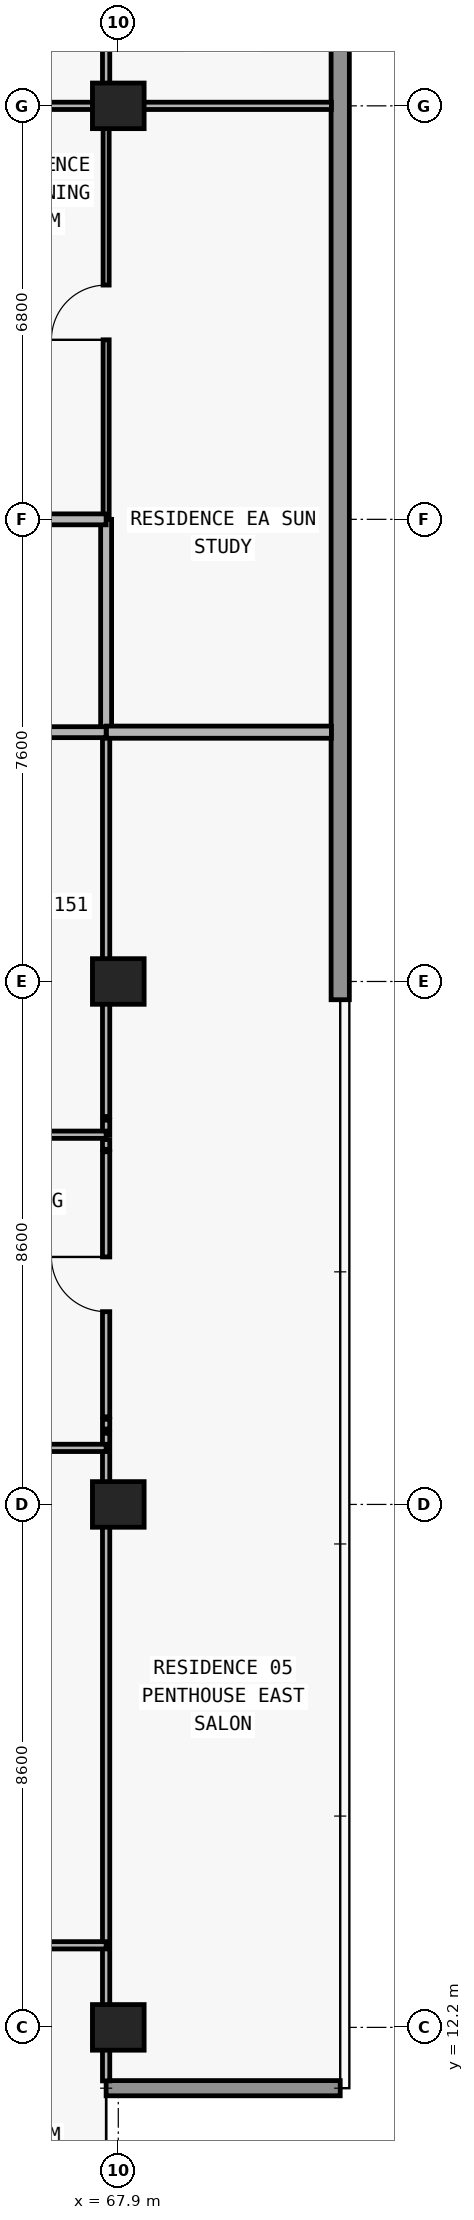
"""IFC4 building model, lengths in metres.
Left out: names, types, materials, properties, quantities, classifications, styles, units other than length and angle.
Written with IfcOpenShell. Run it as: python <this file> out.ifc"""

import sys

from ifc_helpers import new_model, si_unit, direction, frame, frame_2d, origin, origin_2d, place, context, subcontext, project, spatial, rectangle, extrude, element, fill, save


model = new_model("IFC4")
c1 = context("Model", 3, precision=1e-05, world=origin(), true_north=direction((0.0, 1.0)))
c2 = subcontext(c1, "Body", "Model", "MODEL_VIEW")
j1 = project(units=[si_unit("LENGTHUNIT", "METRE"), si_unit("PLANEANGLEUNIT", "RADIAN")], contexts=[c1])
p1 = place(None, origin())
s1 = spatial("IfcSite", under=j1, at=p1, CompositionType="ELEMENT")
p2 = place(p1, origin())
s2 = spatial("IfcBuilding", under=s1, at=p2, CompositionType="ELEMENT")
p3 = place(p2, frame((0.0, 0.0, 195.0)))
s3 = spatial("IfcBuildingStorey", under=s2, at=p3, CompositionType="ELEMENT", Elevation=195.0)
for number, where, z_axis, x_axis in (
    (1, (67.9, 12.2, 0.0), (0.0, 0.0, 1.0), (1.0, 0.0, 0.0)),
    (2, (67.9, 20.8, 0.0), (0.0, 0.0, 1.0), (1.0, 0.0, 0.0)),
    (3, (67.9, 29.4, 0.0), (0.0, 0.0, 1.0), (1.0, 0.0, 0.0)),
    (4, (67.9, 43.8, 0.0), (0.0, 0.0, 1.0), (1.0, 0.0, 0.0)),
):
    element("IfcColumn", number, at=place(p3, frame(where, z_axis=z_axis, x_axis=x_axis)), inside=s3, PredefinedType="COLUMN", context=c2, shape_type="SweptSolid", body=[
        extrude(rectangle(XDim=0.85, YDim=0.75, at=origin_2d()), origin(), (0.0, 0.0, 1.0), 3.05),
    ])
p4 = place(p3, frame((67.7, 11.2, 0.0), z_axis=(0.0, 0.0, 1.0), x_axis=(1.0, 0.0, 0.0)))
e5 = element("IfcWall", 5, at=p4, inside=s3, PredefinedType="ELEMENTEDWALL", context=c2, shape_type="SweptSolid", body=[
    extrude(rectangle(XDim=3.85, YDim=0.25, at=frame_2d((1.925, 0.0))), origin(), (0.0, 0.0, 1.0), 3.05),
])
p5 = place(p3, frame((71.55, 47.0, 0.0), z_axis=(0.0, 0.0, 1.0), x_axis=(0.0, -1.0, 0.0)))
e6 = element("IfcWall", 6, at=p5, inside=s3, PredefinedType="STANDARD", context=c2, shape_type="SweptSolid", body=[
    extrude(rectangle(XDim=17.9, YDim=0.3, at=frame_2d((8.95, 0.0))), origin(), (0.0, 0.0, 1.0), 3.05),
])
p6 = place(p3, frame((67.7, 11.32, 0.0), z_axis=(0.0, 0.0, 1.0), x_axis=(0.0, 1.0, 0.0)))
e7 = element("IfcWall", 7, at=p6, inside=s3, PredefinedType="PARTITIONING", context=c2, shape_type="SweptSolid", body=[
    extrude(rectangle(XDim=10.65, YDim=0.12, at=frame_2d((5.325, 0.0))), origin(), (0.0, 0.0, 1.0), 2.263),
])
p7 = place(p3, frame((67.7, 22.04, 0.0), z_axis=(0.0, 0.0, 1.0), x_axis=(0.0, 1.0, 0.0)))
e8 = element("IfcWall", 8, at=p7, inside=s3, PredefinedType="PARTITIONING", context=c2, shape_type="SweptSolid", body=[
    extrude(rectangle(XDim=0.16, YDim=0.12, at=frame_2d((0.08, 0.0))), origin(), (0.0, 0.0, 1.0), 2.263),
])
p8 = place(p3, frame((67.7, 22.24, 0.0), z_axis=(0.0, 0.0, 1.0), x_axis=(0.0, 1.0, 0.0)))
e9 = element("IfcWall", 9, at=p8, inside=s3, PredefinedType="PARTITIONING", context=c2, shape_type="SweptSolid", body=[
    extrude(rectangle(XDim=4.36, YDim=0.12, at=frame_2d((2.18, 0.0))), origin(), (0.0, 0.0, 1.0), 2.263),
])
p9 = place(p8, frame((1.73, 0.0, 0.0)))
e10 = element("IfcOpeningElement", 10, at=p9, cuts=e9, PredefinedType="OPENING", context=c2, shape_type="SweptSolid", body=[
    extrude(rectangle(XDim=0.9, YDim=2.15, at=frame_2d((0.45, 1.075))), frame((0.0, 0.07, 0.0), z_axis=(0.0, -1.0, 0.0), x_axis=(1.0, 0.0, 0.0)), (0.0, 0.0, 1.0), 0.14),
])
p10 = place(p3, frame((67.7, 26.64, 0.0), z_axis=(0.0, 0.0, 1.0), x_axis=(0.0, 1.0, 0.0)))
e11 = element("IfcWall", 11, at=p10, inside=s3, PredefinedType="PARTITIONING", context=c2, shape_type="SweptSolid", body=[
    extrude(rectangle(XDim=0.16, YDim=0.12, at=frame_2d((0.08, 0.0))), origin(), (0.0, 0.0, 1.0), 2.263),
])
p11 = place(p3, frame((67.7, 26.88, 0.0), z_axis=(0.0, 0.0, 1.0), x_axis=(0.0, 1.0, 0.0)))
e12 = element("IfcWall", 12, at=p11, inside=s3, PredefinedType="PARTITIONING", context=c2, shape_type="SweptSolid", body=[
    extrude(rectangle(XDim=0.24, YDim=0.12, at=frame_2d((0.12, 0.0))), origin(), (0.0, 0.0, 1.0), 2.263),
])
p12 = place(p3, frame((67.7, 27.18, 0.0), z_axis=(0.0, 0.0, 1.0), x_axis=(0.0, 1.0, 0.0)))
e13 = element("IfcWall", 13, at=p12, inside=s3, PredefinedType="PARTITIONING", context=c2, shape_type="SweptSolid", body=[
    extrude(rectangle(XDim=6.32, YDim=0.12, at=frame_2d((3.16, 0.0))), origin(), (0.0, 0.0, 1.0), 2.263),
])
p13 = place(p3, frame((67.7, 33.505, 0.0), z_axis=(0.0, 0.0, 1.0), x_axis=(0.0, 1.0, 0.0)))
e14 = element("IfcWall", 14, at=p13, inside=s3, PredefinedType="PARTITIONING", context=c2, shape_type="SweptSolid", body=[
    extrude(rectangle(XDim=3.495, YDim=0.18, at=frame_2d((1.748, 0.0))), origin(), (0.0, 0.0, 1.0), 2.263),
])
p14 = place(p3, frame((67.7, 37.005, 0.0), z_axis=(0.0, 0.0, 1.0), x_axis=(0.0, 1.0, 0.0)))
e15 = element("IfcWall", 15, at=p14, inside=s3, PredefinedType="MOVABLE", context=c2, shape_type="SweptSolid", body=[
    extrude(rectangle(XDim=6.795, YDim=0.1, at=frame_2d((3.397, 0.0))), origin(), (0.0, 0.0, 1.0), 2.263),
])
p15 = place(p14, frame((2.948, 0.0, 0.0)))
e16 = element("IfcOpeningElement", 16, at=p15, cuts=e15, PredefinedType="OPENING", context=c2, shape_type="SweptSolid", body=[
    extrude(rectangle(XDim=0.9, YDim=2.15, at=frame_2d((0.45, 1.075))), frame((0.0, 0.06, 0.0), z_axis=(0.0, -1.0, 0.0), x_axis=(1.0, 0.0, 0.0)), (0.0, 0.0, 1.0), 0.12),
])
p16 = place(p3, frame((67.7, 43.805, 0.0), z_axis=(0.0, 0.0, 1.0), x_axis=(0.0, 1.0, 0.0)))
e17 = element("IfcWall", 17, at=p16, inside=s3, PredefinedType="PARTITIONING", context=c2, shape_type="SweptSolid", body=[
    extrude(rectangle(XDim=3.075, YDim=0.12, at=frame_2d((1.538, 0.0))), origin(), (0.0, 0.0, 1.0), 3.05),
])
p17 = place(p16, frame((1.087, 0.0, 0.0)))
e18 = element("IfcOpeningElement", 18, at=p17, cuts=e17, PredefinedType="OPENING", context=c2, shape_type="SweptSolid", body=[
    extrude(rectangle(XDim=0.9, YDim=2.15, at=frame_2d((0.45, 1.075))), frame((0.0, 0.07, 0.0), z_axis=(0.0, -1.0, 0.0), x_axis=(1.0, 0.0, 0.0)), (0.0, 0.0, 1.0), 0.14),
])
p18 = place(p3, frame((63.354, 13.55, 0.0), z_axis=(0.0, 0.0, 1.0), x_axis=(1.0, 0.0, 0.0)))
e19 = element("IfcWall", 19, at=p18, inside=s3, PredefinedType="PARTITIONING", context=c2, shape_type="SweptSolid", body=[
    extrude(rectangle(XDim=4.346, YDim=0.12, at=frame_2d((2.173, 0.0))), origin(), (0.0, 0.0, 1.0), 3.05),
])
p19 = place(p18, frame((1.723, 0.0, 0.0)))
e20 = element("IfcOpeningElement", 20, at=p19, cuts=e19, PredefinedType="OPENING", context=c2, shape_type="SweptSolid", body=[
    extrude(rectangle(XDim=0.9, YDim=2.15, at=frame_2d((0.45, 1.075))), frame((0.0, 0.07, 0.0), z_axis=(0.0, -1.0, 0.0), x_axis=(1.0, 0.0, 0.0)), (0.0, 0.0, 1.0), 0.14),
])
p20 = place(p3, frame((59.5, 21.73, 0.0), z_axis=(0.0, 0.0, 1.0), x_axis=(1.0, 0.0, 0.0)))
e21 = element("IfcWall", 21, at=p20, inside=s3, PredefinedType="PARTITIONING", context=c2, shape_type="SweptSolid", body=[
    extrude(rectangle(XDim=8.2, YDim=0.12, at=frame_2d((4.1, 0.0))), origin(), (0.0, 0.0, 1.0), 3.05),
])
p21 = place(p20, frame((1.477, 0.0, 0.0)))
e22 = element("IfcOpeningElement", 22, at=p21, cuts=e21, PredefinedType="OPENING", context=c2, shape_type="SweptSolid", body=[
    extrude(rectangle(XDim=0.9, YDim=2.15, at=frame_2d((0.45, 1.075))), frame((0.0, 0.07, 0.0), z_axis=(0.0, -1.0, 0.0), x_axis=(1.0, 0.0, 0.0)), (0.0, 0.0, 1.0), 0.14),
])
p22 = place(p20, frame((5.989, 0.0, 0.0)))
e23 = element("IfcOpeningElement", 23, at=p22, cuts=e21, PredefinedType="OPENING", context=c2, shape_type="SweptSolid", body=[
    extrude(rectangle(XDim=0.9, YDim=2.15, at=frame_2d((0.45, 1.075))), frame((0.0, 0.07, 0.0), z_axis=(0.0, -1.0, 0.0), x_axis=(1.0, 0.0, 0.0)), (0.0, 0.0, 1.0), 0.14),
])
p23 = place(p3, frame((59.5, 26.88, 0.0), z_axis=(0.0, 0.0, 1.0), x_axis=(1.0, 0.0, 0.0)))
e24 = element("IfcWall", 24, at=p23, inside=s3, PredefinedType="PARTITIONING", context=c2, shape_type="SweptSolid", body=[
    extrude(rectangle(XDim=8.2, YDim=0.12, at=frame_2d((4.1, 0.0))), origin(), (0.0, 0.0, 1.0), 3.05),
])
p24 = place(p23, frame((1.889, 0.0, 0.0)))
e25 = element("IfcOpeningElement", 25, at=p24, cuts=e24, PredefinedType="OPENING", context=c2, shape_type="SweptSolid", body=[
    extrude(rectangle(XDim=0.9, YDim=2.15, at=frame_2d((0.45, 1.075))), frame((0.0, 0.07, 0.0), z_axis=(0.0, -1.0, 0.0), x_axis=(1.0, 0.0, 0.0)), (0.0, 0.0, 1.0), 0.14),
])
p25 = place(p3, frame((10.105, 33.5, 0.0), z_axis=(0.0, 0.0, 1.0), x_axis=(1.0, 0.0, 0.0)))
e26 = element("IfcWall", 26, at=p25, inside=s3, PredefinedType="PARTITIONING", context=c2, shape_type="SweptSolid", body=[
    extrude(rectangle(XDim=57.595, YDim=0.18, at=frame_2d((28.797, 0.0))), origin(), (0.0, 0.0, 1.0), 3.05),
])
p26 = place(p25, frame((2.824, 0.0, 0.0)))
e27 = element("IfcOpeningElement", 27, at=p26, cuts=e26, PredefinedType="OPENING", context=c2, shape_type="SweptSolid", body=[
    extrude(rectangle(XDim=1.0, YDim=2.2, at=frame_2d((0.5, 1.1))), frame((0.0, 0.1, 0.0), z_axis=(0.0, -1.0, 0.0), x_axis=(1.0, 0.0, 0.0)), (0.0, 0.0, 1.0), 0.2),
])
p27 = place(p25, frame((19.47, 0.0, 0.0)))
e28 = element("IfcOpeningElement", 28, at=p27, cuts=e26, PredefinedType="OPENING", context=c2, shape_type="SweptSolid", body=[
    extrude(rectangle(XDim=1.0, YDim=2.2, at=frame_2d((0.5, 1.1))), frame((0.0, 0.1, 0.0), z_axis=(0.0, -1.0, 0.0), x_axis=(1.0, 0.0, 0.0)), (0.0, 0.0, 1.0), 0.2),
])
p28 = place(p25, frame((27.527, 0.0, 0.0)))
e29 = element("IfcOpeningElement", 29, at=p28, cuts=e26, PredefinedType="OPENING", context=c2, shape_type="SweptSolid", body=[
    extrude(rectangle(XDim=1.0, YDim=2.2, at=frame_2d((0.5, 1.1))), frame((0.0, 0.1, 0.0), z_axis=(0.0, -1.0, 0.0), x_axis=(1.0, 0.0, 0.0)), (0.0, 0.0, 1.0), 0.2),
])
p29 = place(p25, frame((43.87, 0.0, 0.0)))
e30 = element("IfcOpeningElement", 30, at=p29, cuts=e26, PredefinedType="OPENING", context=c2, shape_type="SweptSolid", body=[
    extrude(rectangle(XDim=1.0, YDim=2.2, at=frame_2d((0.5, 1.1))), frame((0.0, 0.1, 0.0), z_axis=(0.0, -1.0, 0.0), x_axis=(1.0, 0.0, 0.0)), (0.0, 0.0, 1.0), 0.2),
])
p30 = place(p25, frame((52.17, 0.0, 0.0)))
e31 = element("IfcOpeningElement", 31, at=p30, cuts=e26, PredefinedType="OPENING", context=c2, shape_type="SweptSolid", body=[
    extrude(rectangle(XDim=1.0, YDim=2.2, at=frame_2d((0.5, 1.1))), frame((0.0, 0.1, 0.0), z_axis=(0.0, -1.0, 0.0), x_axis=(1.0, 0.0, 0.0)), (0.0, 0.0, 1.0), 0.2),
])
p31 = place(p3, frame((67.705, 33.5, 0.0), z_axis=(0.0, 0.0, 1.0), x_axis=(1.0, 0.0, 0.0)))
e32 = element("IfcWall", 32, at=p31, inside=s3, PredefinedType="PARTITIONING", context=c2, shape_type="SweptSolid", body=[
    extrude(rectangle(XDim=3.7, YDim=0.2, at=frame_2d((1.85, 0.0))), origin(), (0.0, 0.0, 1.0), 3.05),
])
p32 = place(p3, frame((59.855, 37.0, 0.0), z_axis=(0.0, 0.0, 1.0), x_axis=(1.0, 0.0, 0.0)))
e33 = element("IfcWall", 33, at=p32, inside=s3, PredefinedType="PARTITIONING", context=c2, shape_type="SweptSolid", body=[
    extrude(rectangle(XDim=7.845, YDim=0.18, at=frame_2d((3.922, 0.0))), origin(), (0.0, 0.0, 1.0), 3.05),
])
p33 = place(p32, frame((3.349, 0.0, 0.0)))
e34 = element("IfcOpeningElement", 34, at=p33, cuts=e33, PredefinedType="OPENING", context=c2, shape_type="SweptSolid", body=[
    extrude(rectangle(XDim=1.0, YDim=2.2, at=frame_2d((0.5, 1.1))), frame((0.0, 0.1, 0.0), z_axis=(0.0, -1.0, 0.0), x_axis=(1.0, 0.0, 0.0)), (0.0, 0.0, 1.0), 0.2),
])
p34 = place(p3, frame((59.845, 43.8, 0.0), z_axis=(0.0, 0.0, 1.0), x_axis=(1.0, 0.0, 0.0)))
e35 = element("IfcWall", 35, at=p34, inside=s3, PredefinedType="PARTITIONING", context=c2, shape_type="SweptSolid", body=[
    extrude(rectangle(XDim=11.56, YDim=0.12, at=frame_2d((5.78, 0.0))), origin(), (0.0, 0.0, 1.0), 2.418),
])
p35 = place(p34, frame((3.409, 0.0, 0.0)))
e36 = element("IfcOpeningElement", 36, at=p35, cuts=e35, PredefinedType="OPENING", context=c2, shape_type="SweptSolid", body=[
    extrude(rectangle(XDim=0.9, YDim=2.15, at=frame_2d((0.45, 1.075))), frame((0.0, 0.07, 0.0), z_axis=(0.0, -1.0, 0.0), x_axis=(1.0, 0.0, 0.0)), (0.0, 0.0, 1.0), 0.14),
])
p36 = place(p34, frame((0.728, 0.0, 0.0)))
e37 = element("IfcOpeningElement", 37, at=p36, cuts=e35, PredefinedType="OPENING", context=c2, shape_type="SweptSolid", body=[
    extrude(rectangle(XDim=0.85, YDim=2.1, at=frame_2d((0.425, 1.05))), frame((0.0, 0.07, 0.0), z_axis=(0.0, -1.0, 0.0), x_axis=(1.0, 0.0, 0.0)), (0.0, 0.0, 1.0), 0.14),
])
p37 = place(p9, origin())
e38 = element("IfcDoor", 38, at=p37, inside=s3, OperationType="SINGLE_SWING_RIGHT", PredefinedType="DOOR", context=c2, shape_type="SweptSolid", body=[
    extrude(rectangle(XDim=0.9, YDim=2.15, at=frame_2d((0.45, 1.075))), frame((0.0, 0.025, 0.0), z_axis=(0.0, -1.0, 0.0), x_axis=(1.0, 0.0, 0.0)), (0.0, 0.0, 1.0), 0.05),
])
fill(e10, e38)
p38 = place(p15, origin())
e39 = element("IfcDoor", 39, at=p38, inside=s3, OperationType="SINGLE_SWING_LEFT", PredefinedType="DOOR", context=c2, shape_type="SweptSolid", body=[
    extrude(rectangle(XDim=0.9, YDim=2.15, at=frame_2d((0.45, 1.075))), frame((0.0, 0.025, 0.0), z_axis=(0.0, -1.0, 0.0), x_axis=(1.0, 0.0, 0.0)), (0.0, 0.0, 1.0), 0.05),
])
fill(e16, e39)
save(model, sys.argv[1])
